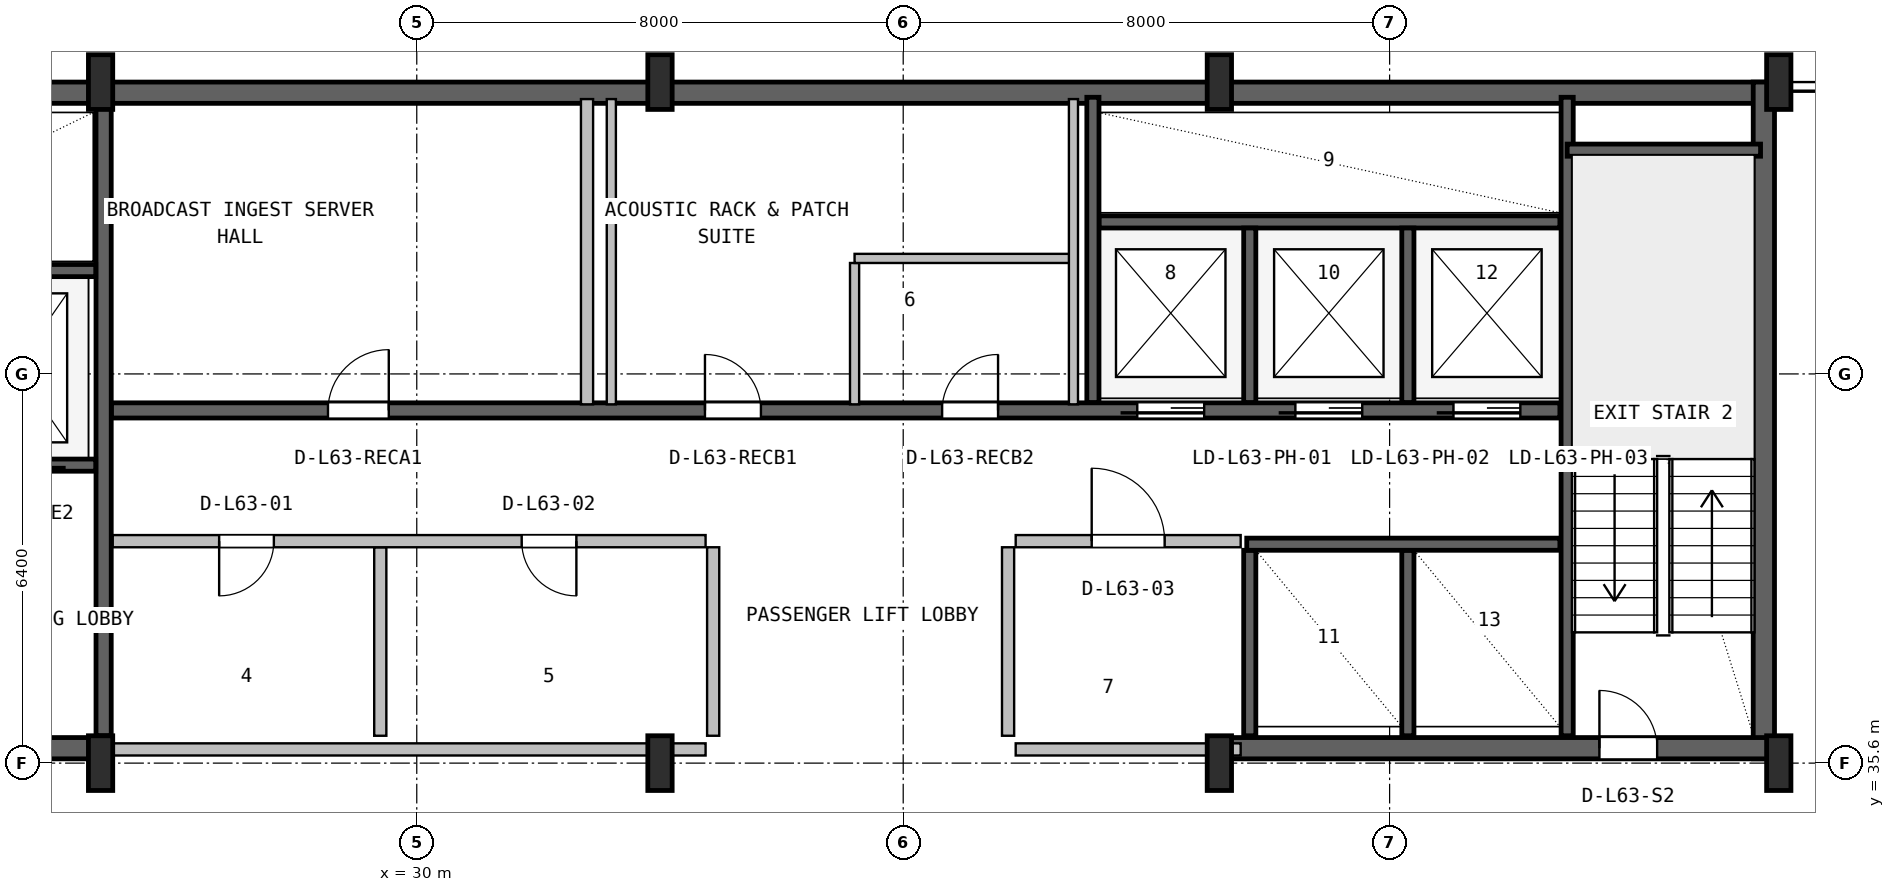
"""IFC4 building model, lengths in metres.
Left out: names, types, materials, properties, quantities, classifications, styles, units other than length and angle.
Written with IfcOpenShell. Run it as: python <this file> out.ifc"""

import sys

from ifc_helpers import new_model, si_unit, direction, frame, frame_2d, origin, origin_2d, place, context, subcontext, project, spatial, rectangle, i_section, extrude, source, transform, mapped, element, fill, save


model = new_model("IFC4")
c1 = context("Model", 3, precision=1e-05, world=origin(), true_north=direction((0.0, 1.0)))
c2 = subcontext(c1, "Body", "Model", "MODEL_VIEW")
j1 = project(units=[si_unit("LENGTHUNIT", "METRE"), si_unit("PLANEANGLEUNIT", "RADIAN")], contexts=[c1])
p1 = place(None, origin())
s1 = spatial("IfcSite", under=j1, at=p1, CompositionType="ELEMENT")
p2 = place(p1, origin())
s2 = spatial("IfcBuilding", under=s1, at=p2, CompositionType="ELEMENT")
p3 = place(p2, frame((0.0, 0.0, 254.6)))
s3 = spatial("IfcBuildingStorey", under=s2, at=p3, CompositionType="ELEMENT", Elevation=254.6)
p4 = place(p3, frame((15.6, 46.625, 0.0), z_axis=(0.0, 0.0, 1.0), x_axis=(1.0, 0.0, 0.0)))
e1 = element("IfcWall", 1, at=p4, inside=s3, PredefinedType="SHEAR", context=c2, shape_type="SweptSolid", body=[
    extrude(rectangle(XDim=36.8, YDim=0.35, at=frame_2d((18.4, 0.0))), origin(), (0.0, 0.0, 1.0), 3.55),
])
p5 = place(p3, frame((52.155, 35.67, 0.0), z_axis=(0.0, 0.0, 1.0), x_axis=(0.0, 1.0, 0.0)))
e2 = element("IfcWall", 2, at=p5, inside=s3, PredefinedType="SHEAR", context=c2, shape_type="SweptSolid", body=[
    extrude(rectangle(XDim=11.13, YDim=0.35, at=frame_2d((5.565, 0.0))), origin(), (0.0, 0.0, 1.0), 3.55),
])
p6 = place(p3, frame((15.67, 35.845, 0.0), z_axis=(0.0, 0.0, 1.0), x_axis=(1.0, 0.0, 0.0)))
e3 = element("IfcWall", 3, at=p6, inside=s3, PredefinedType="SHEAR", context=c2, shape_type="SweptSolid", body=[
    extrude(rectangle(XDim=9.13, YDim=0.35, at=frame_2d((4.565, 0.0))), origin(), (0.0, 0.0, 1.0), 3.55),
])
p7 = place(p6, frame((5.4, 0.0, 0.0)))
e4 = element("IfcOpeningElement", 4, at=p7, cuts=e3, PredefinedType="OPENING", context=c2, shape_type="SweptSolid", body=[
    extrude(rectangle(XDim=1.0, YDim=2.1, at=frame_2d((0.5, 1.05))), frame((0.0, 0.185, 0.0), z_axis=(0.0, -1.0, 0.0), x_axis=(1.0, 0.0, 0.0)), (0.0, 0.0, 1.0), 0.37),
])
p8 = place(p3, frame((43.2, 35.845, 0.0), z_axis=(0.0, 0.0, 1.0), x_axis=(1.0, 0.0, 0.0)))
e5 = element("IfcWall", 5, at=p8, inside=s3, PredefinedType="SHEAR", context=c2, shape_type="SweptSolid", body=[
    extrude(rectangle(XDim=9.13, YDim=0.35, at=frame_2d((4.565, 0.0))), origin(), (0.0, 0.0, 1.0), 3.55),
])
p9 = place(p8, frame((6.25, 0.0, 0.0)))
e6 = element("IfcOpeningElement", 6, at=p9, cuts=e5, PredefinedType="OPENING", context=c2, shape_type="SweptSolid", body=[
    extrude(rectangle(XDim=0.95, YDim=2.1, at=frame_2d((0.475, 1.05))), frame((0.0, 0.185, 0.0), z_axis=(0.0, -1.0, 0.0), x_axis=(1.0, 0.0, 0.0)), (0.0, 0.0, 1.0), 0.37),
])
m1 = source(origin(), c2, "Body", "SweptSolid", [
    extrude(i_section(OverallWidth=0.4, OverallDepth=0.9, WebThickness=0.016, FlangeThickness=0.028, FilletRadius=0.016, at=origin_2d()), origin(), (0.0, 0.0, 1.0), 3.8),
])
for number, where, z_axis, x_axis in (
    (7, (24.8, 35.6, 0.0), (0.0, 0.0, 1.0), (1.0, 0.0, 0.0)),
    (8, (24.8, 46.8, 0.0), (0.0, 0.0, 1.0), (1.0, 0.0, 0.0)),
    (9, (34.0, 35.6, 0.0), (0.0, 0.0, 1.0), (1.0, 0.0, 0.0)),
    (10, (34.0, 46.8, 0.0), (0.0, 0.0, 1.0), (1.0, 0.0, 0.0)),
    (11, (43.2, 35.6, 0.0), (0.0, 0.0, 1.0), (1.0, 0.0, 0.0)),
    (12, (43.2, 46.8, 0.0), (0.0, 0.0, 1.0), (1.0, 0.0, 0.0)),
    (13, (52.4, 35.6, 0.0), (0.0, 0.0, 1.0), (1.0, 0.0, 0.0)),
    (14, (52.4, 46.8, 0.0), (0.0, 0.0, 1.0), (1.0, 0.0, 0.0)),
):
    element("IfcColumn", number, at=place(p3, frame(where, z_axis=z_axis, x_axis=x_axis)), inside=s3, PredefinedType="COLUMN", context=c2, shape_type="MappedRepresentation", body=[
        mapped(m1, transform((0.0, 0.0, 0.0), x_axis=(1.0, 0.0, 0.0), y_axis=(0.0, 1.0, 0.0), z_axis=(0.0, 0.0, 1.0), scale=1.0)),
    ])
p10 = place(p3, frame((24.85, 36.05, 0.0), z_axis=(0.0, 0.0, 1.0), x_axis=(0.0, 1.0, 0.0)))
e15 = element("IfcWall", 15, at=p10, inside=s3, PredefinedType="SHEAR", context=c2, shape_type="SweptSolid", body=[
    extrude(rectangle(XDim=10.45, YDim=0.25, at=frame_2d((5.225, 0.0))), origin(), (0.0, 0.0, 1.0), 3.55),
])
p11 = place(p3, frame((19.2, 40.5, 0.0), z_axis=(0.0, 0.0, 1.0), x_axis=(1.0, 0.0, 0.0)))
e16 = element("IfcWall", 16, at=p11, inside=s3, PredefinedType="SHEAR", context=c2, shape_type="SweptSolid", body=[
    extrude(rectangle(XDim=5.52, YDim=0.2, at=frame_2d((2.76, 0.0))), origin(), (0.0, 0.0, 1.0), 3.55),
])
p12 = place(p11, frame((1.05, 0.0, 0.0)))
e17 = element("IfcOpeningElement", 17, at=p12, cuts=e16, PredefinedType="OPENING", context=c2, shape_type="SweptSolid", body=[
    extrude(rectangle(XDim=1.1, YDim=2.18, at=frame_2d((0.55, 1.09))), frame((0.0, 0.11, 0.0), z_axis=(0.0, -1.0, 0.0), x_axis=(1.0, 0.0, 0.0)), (0.0, 0.0, 1.0), 0.22),
])
p13 = place(p11, frame((3.65, 0.0, 0.0)))
e18 = element("IfcOpeningElement", 18, at=p13, cuts=e16, PredefinedType="OPENING", context=c2, shape_type="SweptSolid", body=[
    extrude(rectangle(XDim=1.1, YDim=2.18, at=frame_2d((0.55, 1.09))), frame((0.0, 0.11, 0.0), z_axis=(0.0, -1.0, 0.0), x_axis=(1.0, 0.0, 0.0)), (0.0, 0.0, 1.0), 0.22),
])
p14 = place(p3, frame((19.2, 43.7, 0.0), z_axis=(0.0, 0.0, 1.0), x_axis=(1.0, 0.0, 0.0)))
e19 = element("IfcWall", 19, at=p14, inside=s3, PredefinedType="SHEAR", context=c2, shape_type="SweptSolid", body=[
    extrude(rectangle(XDim=5.52, YDim=0.2, at=frame_2d((2.76, 0.0))), origin(), (0.0, 0.0, 1.0), 3.55),
])
p15 = place(p3, frame((48.92, 36.05, 0.0), z_axis=(0.0, 0.0, 1.0), x_axis=(0.0, 1.0, 0.0)))
e20 = element("IfcWall", 20, at=p15, inside=s3, PredefinedType="SHEAR", context=c2, shape_type="SweptSolid", body=[
    extrude(rectangle(XDim=10.5, YDim=0.2, at=frame_2d((5.25, 0.0))), origin(), (0.0, 0.0, 1.0), 3.55),
])
p16 = place(p3, frame((48.92, 45.68, 0.0), z_axis=(0.0, 0.0, 1.0), x_axis=(1.0, 0.0, 0.0)))
e21 = element("IfcWall", 21, at=p16, inside=s3, PredefinedType="SHEAR", context=c2, shape_type="SweptSolid", body=[
    extrude(rectangle(XDim=3.18, YDim=0.2, at=frame_2d((1.59, 0.0))), origin(), (0.0, 0.0, 1.0), 3.55),
])
p17 = place(p3, frame((24.98, 41.4, 0.0), z_axis=(0.0, 0.0, 1.0), x_axis=(1.0, 0.0, 0.0)))
e22 = element("IfcWall", 22, at=p17, inside=s3, PredefinedType="SHEAR", context=c2, shape_type="SweptSolid", body=[
    extrude(rectangle(XDim=23.82, YDim=0.25, at=frame_2d((11.91, 0.0))), origin(), (0.0, 0.0, 1.0), 3.55),
])
p18 = place(p17, frame((16.87, 0.0, 0.0)))
e23 = element("IfcOpeningElement", 23, at=p18, cuts=e22, PredefinedType="OPENING", context=c2, shape_type="SweptSolid", body=[
    extrude(rectangle(XDim=1.1, YDim=2.18, at=frame_2d((0.55, 1.09))), frame((0.0, 0.135, 0.0), z_axis=(0.0, -1.0, 0.0), x_axis=(1.0, 0.0, 0.0)), (0.0, 0.0, 1.0), 0.27),
])
p19 = place(p17, frame((19.47, 0.0, 0.0)))
e24 = element("IfcOpeningElement", 24, at=p19, cuts=e22, PredefinedType="OPENING", context=c2, shape_type="SweptSolid", body=[
    extrude(rectangle(XDim=1.1, YDim=2.18, at=frame_2d((0.55, 1.09))), frame((0.0, 0.135, 0.0), z_axis=(0.0, -1.0, 0.0), x_axis=(1.0, 0.0, 0.0)), (0.0, 0.0, 1.0), 0.27),
])
p20 = place(p17, frame((22.07, 0.0, 0.0)))
e25 = element("IfcOpeningElement", 25, at=p20, cuts=e22, PredefinedType="OPENING", context=c2, shape_type="SweptSolid", body=[
    extrude(rectangle(XDim=1.1, YDim=2.18, at=frame_2d((0.55, 1.09))), frame((0.0, 0.135, 0.0), z_axis=(0.0, -1.0, 0.0), x_axis=(1.0, 0.0, 0.0)), (0.0, 0.0, 1.0), 0.27),
])
p21 = place(p17, frame((3.56, 0.0, 0.0)))
e26 = element("IfcOpeningElement", 26, at=p21, cuts=e22, PredefinedType="OPENING", context=c2, shape_type="SweptSolid", body=[
    extrude(rectangle(XDim=1.0, YDim=2.08, at=frame_2d((0.5, 1.04))), frame((0.0, 0.135, 0.0), z_axis=(0.0, -1.0, 0.0), x_axis=(1.0, 0.0, 0.0)), (0.0, 0.0, 1.0), 0.27),
])
p22 = place(p17, frame((9.76, 0.0, 0.0)))
e27 = element("IfcOpeningElement", 27, at=p22, cuts=e22, PredefinedType="OPENING", context=c2, shape_type="SweptSolid", body=[
    extrude(rectangle(XDim=0.92, YDim=2.08, at=frame_2d((0.46, 1.04))), frame((0.0, 0.135, 0.0), z_axis=(0.0, -1.0, 0.0), x_axis=(1.0, 0.0, 0.0)), (0.0, 0.0, 1.0), 0.27),
])
p23 = place(p17, frame((13.66, 0.0, 0.0)))
e28 = element("IfcOpeningElement", 28, at=p23, cuts=e22, PredefinedType="OPENING", context=c2, shape_type="SweptSolid", body=[
    extrude(rectangle(XDim=0.92, YDim=2.08, at=frame_2d((0.46, 1.04))), frame((0.0, 0.135, 0.0), z_axis=(0.0, -1.0, 0.0), x_axis=(1.0, 0.0, 0.0)), (0.0, 0.0, 1.0), 0.27),
])
p24 = place(p3, frame((41.22, 44.5, 0.0), z_axis=(0.0, 0.0, 1.0), x_axis=(1.0, 0.0, 0.0)))
e29 = element("IfcWall", 29, at=p24, inside=s3, PredefinedType="SHEAR", context=c2, shape_type="SweptSolid", body=[
    extrude(rectangle(XDim=7.58, YDim=0.2, at=frame_2d((3.79, 0.0))), origin(), (0.0, 0.0, 1.0), 3.55),
])
p25 = place(p3, frame((41.12, 41.53, 0.0), z_axis=(0.0, 0.0, 1.0), x_axis=(0.0, 1.0, 0.0)))
e30 = element("IfcWall", 30, at=p25, inside=s3, PredefinedType="SHEAR", context=c2, shape_type="SweptSolid", body=[
    extrude(rectangle(XDim=5.02, YDim=0.2, at=frame_2d((2.51, 0.0))), origin(), (0.0, 0.0, 1.0), 3.55),
])
for number, where, z_axis, x_axis in (
    (31, (43.7, 41.53, 0.0), (0.0, 0.0, 1.0), (0.0, 1.0, 0.0)),
    (32, (46.3, 41.53, 0.0), (0.0, 0.0, 1.0), (0.0, 1.0, 0.0)),
):
    element("IfcWall", number, at=place(p3, frame(where, z_axis=z_axis, x_axis=x_axis)), inside=s3, PredefinedType="SHEAR", context=c2, shape_type="SweptSolid", body=[
        extrude(rectangle(XDim=2.87, YDim=0.2, at=frame_2d((1.435, 0.0))), origin(), (0.0, 0.0, 1.0), 3.55),
    ])
for number, where, z_axis, x_axis in (
    (33, (43.7, 36.05, 0.0), (0.0, 0.0, 1.0), (0.0, 1.0, 0.0)),
    (34, (46.3, 36.05, 0.0), (0.0, 0.0, 1.0), (0.0, 1.0, 0.0)),
):
    element("IfcWall", number, at=place(p3, frame(where, z_axis=z_axis, x_axis=x_axis)), inside=s3, PredefinedType="SHEAR", context=c2, shape_type="SweptSolid", body=[
        extrude(rectangle(XDim=3.05, YDim=0.2, at=frame_2d((1.525, 0.0))), origin(), (0.0, 0.0, 1.0), 3.55),
    ])
p26 = place(p3, frame((43.65, 39.2, 0.0), z_axis=(0.0, 0.0, 1.0), x_axis=(1.0, 0.0, 0.0)))
e35 = element("IfcWall", 35, at=p26, inside=s3, PredefinedType="SHEAR", context=c2, shape_type="SweptSolid", body=[
    extrude(rectangle(XDim=5.15, YDim=0.2, at=frame_2d((2.575, 0.0))), origin(), (0.0, 0.0, 1.0), 3.55),
])
p27 = place(p3, frame((25.0, 35.825, 0.0), z_axis=(0.0, 0.0, 1.0), x_axis=(1.0, 0.0, 0.0)))
e36 = element("IfcWall", 36, at=p27, inside=s3, PredefinedType="PLUMBINGWALL", context=c2, shape_type="SweptSolid", body=[
    extrude(rectangle(XDim=9.75, YDim=0.2, at=frame_2d((4.875, 0.0))), origin(), (0.0, 0.0, 1.0), 2.575),
])
p28 = place(p3, frame((29.4, 36.05, 0.0), z_axis=(0.0, 0.0, 1.0), x_axis=(0.0, 1.0, 0.0)))
e37 = element("IfcWall", 37, at=p28, inside=s3, PredefinedType="PLUMBINGWALL", context=c2, shape_type="SweptSolid", body=[
    extrude(rectangle(XDim=3.1, YDim=0.2, at=frame_2d((1.55, 0.0))), origin(), (0.0, 0.0, 1.0), 3.53),
])
p29 = place(p3, frame((25.0, 39.25, 0.0), z_axis=(0.0, 0.0, 1.0), x_axis=(1.0, 0.0, 0.0)))
e38 = element("IfcWall", 38, at=p29, inside=s3, PredefinedType="PLUMBINGWALL", context=c2, shape_type="SweptSolid", body=[
    extrude(rectangle(XDim=9.75, YDim=0.2, at=frame_2d((4.875, 0.0))), origin(), (0.0, 0.0, 1.0), 3.53),
])
p30 = place(p29, frame((1.75, 0.0, 0.0)))
e39 = element("IfcOpeningElement", 39, at=p30, cuts=e38, PredefinedType="OPENING", context=c2, shape_type="SweptSolid", body=[
    extrude(rectangle(XDim=0.9, YDim=2.06, at=frame_2d((0.45, 1.03))), frame((0.0, 0.11, 0.0), z_axis=(0.0, -1.0, 0.0), x_axis=(1.0, 0.0, 0.0)), (0.0, 0.0, 1.0), 0.22),
])
p31 = place(p29, frame((6.725, 0.0, 0.0)))
e40 = element("IfcOpeningElement", 40, at=p31, cuts=e38, PredefinedType="OPENING", context=c2, shape_type="SweptSolid", body=[
    extrude(rectangle(XDim=0.9, YDim=2.06, at=frame_2d((0.45, 1.03))), frame((0.0, 0.11, 0.0), z_axis=(0.0, -1.0, 0.0), x_axis=(1.0, 0.0, 0.0)), (0.0, 0.0, 1.0), 0.22),
])
p32 = place(p3, frame((34.875, 36.05, 0.0), z_axis=(0.0, 0.0, 1.0), x_axis=(0.0, 1.0, 0.0)))
e41 = element("IfcWall", 41, at=p32, inside=s3, PredefinedType="PLUMBINGWALL", context=c2, shape_type="SweptSolid", body=[
    extrude(rectangle(XDim=3.1, YDim=0.2, at=frame_2d((1.55, 0.0))), origin(), (0.0, 0.0, 1.0), 3.53),
])
p33 = place(p3, frame((39.85, 35.825, 0.0), z_axis=(0.0, 0.0, 1.0), x_axis=(1.0, 0.0, 0.0)))
e42 = element("IfcWall", 42, at=p33, inside=s3, PredefinedType="SOLIDWALL", context=c2, shape_type="SweptSolid", body=[
    extrude(rectangle(XDim=3.7, YDim=0.2, at=frame_2d((1.85, 0.0))), origin(), (0.0, 0.0, 1.0), 2.575),
])
p34 = place(p3, frame((39.85, 39.25, 0.0), z_axis=(0.0, 0.0, 1.0), x_axis=(1.0, 0.0, 0.0)))
e43 = element("IfcWall", 43, at=p34, inside=s3, PredefinedType="SOLIDWALL", context=c2, shape_type="SweptSolid", body=[
    extrude(rectangle(XDim=3.7, YDim=0.2, at=frame_2d((1.85, 0.0))), origin(), (0.0, 0.0, 1.0), 3.53),
])
p35 = place(p34, frame((1.25, 0.0, 0.0)))
e44 = element("IfcOpeningElement", 44, at=p35, cuts=e43, PredefinedType="OPENING", context=c2, shape_type="SweptSolid", body=[
    extrude(rectangle(XDim=1.2, YDim=2.1, at=frame_2d((0.6, 1.05))), frame((0.0, 0.11, 0.0), z_axis=(0.0, -1.0, 0.0), x_axis=(1.0, 0.0, 0.0)), (0.0, 0.0, 1.0), 0.22),
])
p36 = place(p3, frame((39.725, 36.05, 0.0), z_axis=(0.0, 0.0, 1.0), x_axis=(0.0, 1.0, 0.0)))
e45 = element("IfcWall", 45, at=p36, inside=s3, PredefinedType="SOLIDWALL", context=c2, shape_type="SweptSolid", body=[
    extrude(rectangle(XDim=3.1, YDim=0.2, at=frame_2d((1.55, 0.0))), origin(), (0.0, 0.0, 1.0), 3.53),
])
p37 = place(p3, frame((32.8, 41.5, 0.0), z_axis=(0.0, 0.0, 1.0), x_axis=(0.0, 1.0, 0.0)))
e46 = element("IfcWall", 46, at=p37, inside=s3, PredefinedType="SOLIDWALL", context=c2, shape_type="SweptSolid", body=[
    extrude(rectangle(XDim=5.02, YDim=0.2, at=frame_2d((2.51, 0.0))), origin(), (0.0, 0.0, 1.0), 3.53),
])
p38 = place(p3, frame((37.2, 41.5, 0.0), z_axis=(0.0, 0.0, 1.0), x_axis=(0.0, 1.0, 0.0)))
e47 = element("IfcWall", 47, at=p38, inside=s3, PredefinedType="PARTITIONING", context=c2, shape_type="SweptSolid", body=[
    extrude(rectangle(XDim=2.325, YDim=0.15, at=frame_2d((1.163, 0.0))), origin(), (0.0, 0.0, 1.0), 3.53),
])
p39 = place(p3, frame((37.2, 43.9, 0.0), z_axis=(0.0, 0.0, 1.0), x_axis=(1.0, 0.0, 0.0)))
e48 = element("IfcWall", 48, at=p39, inside=s3, PredefinedType="PARTITIONING", context=c2, shape_type="SweptSolid", body=[
    extrude(rectangle(XDim=3.6, YDim=0.15, at=frame_2d((1.8, 0.0))), origin(), (0.0, 0.0, 1.0), 3.53),
])
for number, where, z_axis, x_axis in (
    (49, (40.8, 41.5, 0.0), (0.0, 0.0, 1.0), (0.0, 1.0, 0.0)),
    (50, (33.2, 41.5, 0.0), (0.0, 0.0, 1.0), (0.0, 1.0, 0.0)),
):
    element("IfcWall", number, at=place(p3, frame(where, z_axis=z_axis, x_axis=x_axis)), inside=s3, PredefinedType="PARTITIONING", context=c2, shape_type="SweptSolid", body=[
        extrude(rectangle(XDim=5.02, YDim=0.15, at=frame_2d((2.51, 0.0))), origin(), (0.0, 0.0, 1.0), 3.53),
    ])
m2 = source(origin(), c2, "Body", "SweptSolid", [
    extrude(rectangle(XDim=0.95, YDim=2.1, at=frame_2d((0.475, 1.05))), frame((0.0, 0.025, 0.0), z_axis=(0.0, -1.0, 0.0), x_axis=(1.0, 0.0, 0.0)), (0.0, 0.0, 1.0), 0.05),
])
p40 = place(p9, origin())
e51 = element("IfcDoor", 51, at=p40, inside=s3, OperationType="SINGLE_SWING_LEFT", PredefinedType="DOOR", context=c2, shape_type="MappedRepresentation", body=[
    mapped(m2, transform((0.0, 0.0, 0.0), x_axis=(1.0, 0.0, 0.0), y_axis=(0.0, 1.0, 0.0), z_axis=(0.0, 0.0, 1.0), scale=1.0)),
])
fill(e6, e51)
m3 = source(origin(), c2, "Body", "SweptSolid", [
    extrude(rectangle(XDim=1.1, YDim=2.18, at=frame_2d((0.55, 1.09))), frame((0.0, 0.025, 0.0), z_axis=(0.0, -1.0, 0.0), x_axis=(1.0, 0.0, 0.0)), (0.0, 0.0, 1.0), 0.05),
])
p41 = place(p18, frame((1.1, 0.0, 0.0), z_axis=(0.0, 0.0, 1.0), x_axis=(-1.0, 0.0, 0.0)))
e52 = element("IfcDoor", 52, at=p41, inside=s3, OperationType="SLIDING_TO_LEFT", PredefinedType="DOOR", context=c2, shape_type="MappedRepresentation", body=[
    mapped(m3, transform((0.0, 0.0, 0.0), x_axis=(1.0, 0.0, 0.0), y_axis=(0.0, 1.0, 0.0), z_axis=(0.0, 0.0, 1.0), scale=1.0)),
])
fill(e23, e52)
p42 = place(p19, frame((1.1, 0.0, 0.0), z_axis=(0.0, 0.0, 1.0), x_axis=(-1.0, 0.0, 0.0)))
e53 = element("IfcDoor", 53, at=p42, inside=s3, OperationType="SLIDING_TO_LEFT", PredefinedType="DOOR", context=c2, shape_type="MappedRepresentation", body=[
    mapped(m3, transform((0.0, 0.0, 0.0), x_axis=(1.0, 0.0, 0.0), y_axis=(0.0, 1.0, 0.0), z_axis=(0.0, 0.0, 1.0), scale=1.0)),
])
fill(e24, e53)
p43 = place(p20, frame((1.1, 0.0, 0.0), z_axis=(0.0, 0.0, 1.0), x_axis=(-1.0, 0.0, 0.0)))
e54 = element("IfcDoor", 54, at=p43, inside=s3, OperationType="SLIDING_TO_LEFT", PredefinedType="DOOR", context=c2, shape_type="MappedRepresentation", body=[
    mapped(m3, transform((0.0, 0.0, 0.0), x_axis=(1.0, 0.0, 0.0), y_axis=(0.0, 1.0, 0.0), z_axis=(0.0, 0.0, 1.0), scale=1.0)),
])
fill(e25, e54)
m4 = source(origin(), c2, "Body", "SweptSolid", [
    extrude(rectangle(XDim=1.0, YDim=2.08, at=frame_2d((0.5, 1.04))), frame((0.0, 0.025, 0.0), z_axis=(0.0, -1.0, 0.0), x_axis=(1.0, 0.0, 0.0)), (0.0, 0.0, 1.0), 0.05),
])
p44 = place(p21, origin())
e55 = element("IfcDoor", 55, at=p44, inside=s3, OperationType="SINGLE_SWING_RIGHT", PredefinedType="DOOR", context=c2, shape_type="MappedRepresentation", body=[
    mapped(m4, transform((0.0, 0.0, 0.0), x_axis=(1.0, 0.0, 0.0), y_axis=(0.0, 1.0, 0.0), z_axis=(0.0, 0.0, 1.0), scale=1.0)),
])
fill(e26, e55)
m5 = source(origin(), c2, "Body", "SweptSolid", [
    extrude(rectangle(XDim=0.92, YDim=2.08, at=frame_2d((0.46, 1.04))), frame((0.0, 0.025, 0.0), z_axis=(0.0, -1.0, 0.0), x_axis=(1.0, 0.0, 0.0)), (0.0, 0.0, 1.0), 0.05),
])
p45 = place(p22, origin())
e56 = element("IfcDoor", 56, at=p45, inside=s3, OperationType="SINGLE_SWING_LEFT", PredefinedType="DOOR", context=c2, shape_type="MappedRepresentation", body=[
    mapped(m5, transform((0.0, 0.0, 0.0), x_axis=(1.0, 0.0, 0.0), y_axis=(0.0, 1.0, 0.0), z_axis=(0.0, 0.0, 1.0), scale=1.0)),
])
fill(e27, e56)
p46 = place(p23, origin())
e57 = element("IfcDoor", 57, at=p46, inside=s3, OperationType="SINGLE_SWING_RIGHT", PredefinedType="DOOR", context=c2, shape_type="MappedRepresentation", body=[
    mapped(m5, transform((0.0, 0.0, 0.0), x_axis=(1.0, 0.0, 0.0), y_axis=(0.0, 1.0, 0.0), z_axis=(0.0, 0.0, 1.0), scale=1.0)),
])
fill(e28, e57)
m6 = source(origin(), c2, "Body", "SweptSolid", [
    extrude(rectangle(XDim=0.9, YDim=2.06, at=frame_2d((0.45, 1.03))), frame((0.0, 0.025, 0.0), z_axis=(0.0, -1.0, 0.0), x_axis=(1.0, 0.0, 0.0)), (0.0, 0.0, 1.0), 0.05),
])
p47 = place(p30, frame((0.9, 0.0, 0.0), z_axis=(0.0, 0.0, 1.0), x_axis=(-1.0, 0.0, 0.0)))
e58 = element("IfcDoor", 58, at=p47, inside=s3, OperationType="SINGLE_SWING_LEFT", PredefinedType="DOOR", context=c2, shape_type="MappedRepresentation", body=[
    mapped(m6, transform((0.0, 0.0, 0.0), x_axis=(1.0, 0.0, 0.0), y_axis=(0.0, 1.0, 0.0), z_axis=(0.0, 0.0, 1.0), scale=1.0)),
])
fill(e39, e58)
p48 = place(p31, frame((0.9, 0.0, 0.0), z_axis=(0.0, 0.0, 1.0), x_axis=(-1.0, 0.0, 0.0)))
e59 = element("IfcDoor", 59, at=p48, inside=s3, OperationType="SINGLE_SWING_RIGHT", PredefinedType="DOOR", context=c2, shape_type="MappedRepresentation", body=[
    mapped(m6, transform((0.0, 0.0, 0.0), x_axis=(1.0, 0.0, 0.0), y_axis=(0.0, 1.0, 0.0), z_axis=(0.0, 0.0, 1.0), scale=1.0)),
])
fill(e40, e59)
m7 = source(origin(), c2, "Body", "SweptSolid", [
    extrude(rectangle(XDim=1.2, YDim=2.1, at=frame_2d((0.6, 1.05))), frame((0.0, 0.025, 0.0), z_axis=(0.0, -1.0, 0.0), x_axis=(1.0, 0.0, 0.0)), (0.0, 0.0, 1.0), 0.05),
])
p49 = place(p35, origin())
e60 = element("IfcDoor", 60, at=p49, inside=s3, OperationType="SINGLE_SWING_LEFT", PredefinedType="DOOR", context=c2, shape_type="MappedRepresentation", body=[
    mapped(m7, transform((0.0, 0.0, 0.0), x_axis=(1.0, 0.0, 0.0), y_axis=(0.0, 1.0, 0.0), z_axis=(0.0, 0.0, 1.0), scale=1.0)),
])
fill(e44, e60)
save(model, sys.argv[1])
